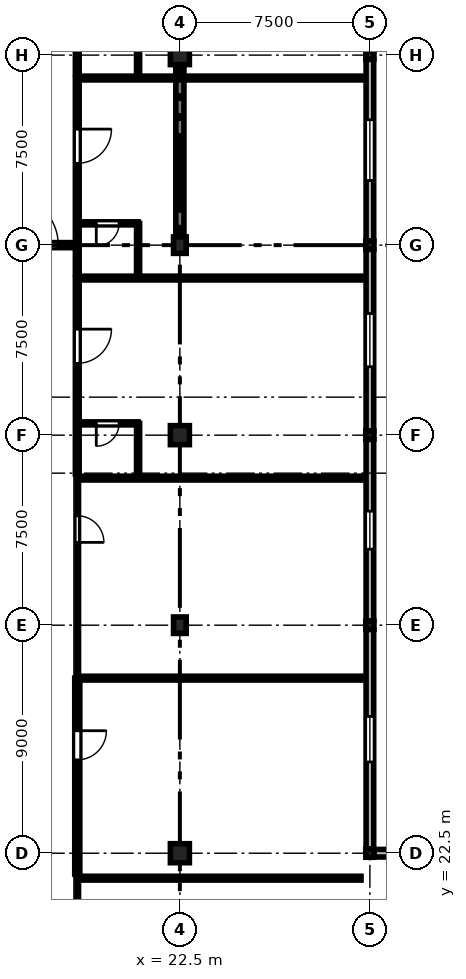
"""IFC4 building model, lengths in metres.
Left out: names, types, materials, properties, quantities, classifications, styles, units other than length and angle.
Written with IfcOpenShell. Run it as: python <this file> out.ifc"""

import sys

from ifc_helpers import new_model, si_unit, direction, frame, frame_2d, origin, origin_2d, place, context, subcontext, project, spatial, rectangle, extrude, element, fill, save


model = new_model("IFC4")
c1 = context("Model", 3, precision=1e-05, world=origin(), true_north=direction((0.0, 1.0)))
c2 = subcontext(c1, "Body", "Model", "MODEL_VIEW")
j1 = project(units=[si_unit("LENGTHUNIT", "METRE"), si_unit("PLANEANGLEUNIT", "RADIAN")], contexts=[c1])
p1 = place(None, origin())
s1 = spatial("IfcSite", under=j1, at=p1, CompositionType="ELEMENT")
p2 = place(p1, origin())
s2 = spatial("IfcBuilding", under=s1, at=p2, CompositionType="ELEMENT")
p3 = place(p2, frame((0.0, 0.0, 14.1)))
s3 = spatial("IfcBuildingStorey", under=s2, at=p3, CompositionType="ELEMENT", Elevation=14.1)
p4 = place(p3, frame((22.5, 22.5, 0.0), z_axis=(0.0, 0.0, 1.0), x_axis=(1.0, 0.0, 0.0)))
e1 = element("IfcColumn", 1, at=p4, inside=s3, PredefinedType="COLUMN", context=c2, shape_type="SweptSolid", body=[
    extrude(rectangle(XDim=0.75, YDim=0.75, at=origin_2d()), origin(), (0.0, 0.0, 1.0), 3.75),
])
p5 = place(p3, frame((22.5, 31.5, 0.0), z_axis=(0.0, 0.0, 1.0), x_axis=(1.0, 0.0, 0.0)))
e2 = element("IfcColumn", 2, at=p5, inside=s3, PredefinedType="COLUMN", context=c2, shape_type="SweptSolid", body=[
    extrude(rectangle(XDim=0.5, YDim=0.65, at=origin_2d()), origin(), (0.0, 0.0, 1.0), 3.75),
])
p6 = place(p3, frame((22.5, 39.0, 0.0), z_axis=(0.0, 0.0, 1.0), x_axis=(1.0, 0.0, 0.0)))
e3 = element("IfcColumn", 3, at=p6, inside=s3, PredefinedType="COLUMN", context=c2, shape_type="SweptSolid", body=[
    extrude(rectangle(XDim=0.75, YDim=0.75, at=origin_2d()), origin(), (0.0, 0.0, 1.0), 3.75),
])
p7 = place(p3, frame((22.5, 46.5, 0.0), z_axis=(0.0, 0.0, 1.0), x_axis=(1.0, 0.0, 0.0)))
e4 = element("IfcColumn", 4, at=p7, inside=s3, PredefinedType="COLUMN", context=c2, shape_type="SweptSolid", body=[
    extrude(rectangle(XDim=0.5, YDim=0.65, at=origin_2d()), origin(), (0.0, 0.0, 1.0), 3.75),
])
p8 = place(p3, frame((22.5, 54.0, 0.0), z_axis=(0.0, 0.0, 1.0), x_axis=(1.0, 0.0, 0.0)))
e5 = element("IfcColumn", 5, at=p8, inside=s3, PredefinedType="COLUMN", context=c2, shape_type="SweptSolid", body=[
    extrude(rectangle(XDim=0.75, YDim=0.75, at=origin_2d()), origin(), (0.0, 0.0, 1.0), 3.75),
])
for number, where, z_axis, x_axis in (
    (6, (30.0, 22.5, 0.0), (0.0, 0.0, 1.0), (1.0, 0.0, 0.0)),
    (7, (30.0, 31.5, 0.0), (0.0, 0.0, 1.0), (1.0, 0.0, 0.0)),
    (8, (30.0, 39.0, 0.0), (0.0, 0.0, 1.0), (1.0, 0.0, 0.0)),
    (9, (30.0, 46.5, 0.0), (0.0, 0.0, 1.0), (1.0, 0.0, 0.0)),
    (10, (30.0, 54.0, 0.0), (0.0, 0.0, 1.0), (1.0, 0.0, 0.0)),
):
    element("IfcColumn", number, at=place(p3, frame(where, z_axis=z_axis, x_axis=x_axis)), inside=s3, PredefinedType="COLUMN", context=c2, shape_type="SweptSolid", body=[
        extrude(rectangle(XDim=0.32, YDim=0.32, at=origin_2d()), origin(), (0.0, 0.0, 1.0), 3.75),
    ])
p9 = place(p3, frame((22.5, 46.95, 0.0), z_axis=(0.0, 0.0, 1.0), x_axis=(0.0, 1.0, 0.0)))
e11 = element("IfcWall", 11, at=p9, inside=s3, PredefinedType="SHEAR", context=c2, shape_type="SweptSolid", body=[
    extrude(rectangle(XDim=6.6, YDim=0.32, at=frame_2d((3.3, 0.0))), origin(), (0.0, 0.0, 1.0), 2.92),
])
p10 = place(p3, frame((30.0, 31.33, 0.0), z_axis=(0.0, 0.0, 1.0), x_axis=(0.0, -1.0, 0.0)))
e12 = element("IfcWall", 12, at=p10, inside=s3, PredefinedType="STANDARD", context=c2, shape_type="SweptSolid", body=[
    extrude(rectangle(XDim=8.66, YDim=0.3, at=frame_2d((4.33, 0.0))), origin(), (0.0, 0.0, 1.0), 2.92),
])
p11 = place(p10, frame((3.43, 0.0, 0.9)))
e13 = element("IfcOpeningElement", 13, at=p11, cuts=e12, PredefinedType="OPENING", context=c2, shape_type="SweptSolid", body=[
    extrude(rectangle(XDim=1.8, YDim=1.74, at=frame_2d((0.9, 0.87))), frame((0.0, 0.16, 0.0), z_axis=(0.0, -1.0, 0.0), x_axis=(1.0, 0.0, 0.0)), (0.0, 0.0, 1.0), 0.32),
])
p12 = place(p3, frame((30.0, 38.83, 0.0), z_axis=(0.0, 0.0, 1.0), x_axis=(0.0, -1.0, 0.0)))
e14 = element("IfcWall", 14, at=p12, inside=s3, PredefinedType="STANDARD", context=c2, shape_type="SweptSolid", body=[
    extrude(rectangle(XDim=7.16, YDim=0.3, at=frame_2d((3.58, 0.0))), origin(), (0.0, 0.0, 1.0), 2.87),
])
p13 = place(p12, frame((2.83, 0.0, 0.9)))
e15 = element("IfcOpeningElement", 15, at=p13, cuts=e14, PredefinedType="OPENING", context=c2, shape_type="SweptSolid", body=[
    extrude(rectangle(XDim=1.5, YDim=1.69, at=frame_2d((0.75, 0.845))), frame((0.0, 0.16, 0.0), z_axis=(0.0, -1.0, 0.0), x_axis=(1.0, 0.0, 0.0)), (0.0, 0.0, 1.0), 0.32),
])
p14 = place(p3, frame((30.0, 46.33, 0.0), z_axis=(0.0, 0.0, 1.0), x_axis=(0.0, -1.0, 0.0)))
e16 = element("IfcWall", 16, at=p14, inside=s3, PredefinedType="STANDARD", context=c2, shape_type="SweptSolid", body=[
    extrude(rectangle(XDim=7.16, YDim=0.3, at=frame_2d((3.58, 0.0))), origin(), (0.0, 0.0, 1.0), 2.87),
])
p15 = place(p14, frame((2.53, 0.0, 0.9)))
e17 = element("IfcOpeningElement", 17, at=p15, cuts=e16, PredefinedType="OPENING", context=c2, shape_type="SweptSolid", body=[
    extrude(rectangle(XDim=2.1, YDim=1.69, at=frame_2d((1.05, 0.845))), frame((0.0, 0.16, 0.0), z_axis=(0.0, -1.0, 0.0), x_axis=(1.0, 0.0, 0.0)), (0.0, 0.0, 1.0), 0.32),
])
p16 = place(p3, frame((30.0, 53.83, 0.0), z_axis=(0.0, 0.0, 1.0), x_axis=(0.0, -1.0, 0.0)))
e18 = element("IfcWall", 18, at=p16, inside=s3, PredefinedType="STANDARD", context=c2, shape_type="SweptSolid", body=[
    extrude(rectangle(XDim=7.16, YDim=0.3, at=frame_2d((3.58, 0.0))), origin(), (0.0, 0.0, 1.0), 2.87),
])
p17 = place(p16, frame((2.38, 0.0, 0.9)))
e19 = element("IfcOpeningElement", 19, at=p17, cuts=e18, PredefinedType="OPENING", context=c2, shape_type="SweptSolid", body=[
    extrude(rectangle(XDim=2.4, YDim=1.69, at=frame_2d((1.2, 0.845))), frame((0.0, 0.16, 0.0), z_axis=(0.0, -1.0, 0.0), x_axis=(1.0, 0.0, 0.0)), (0.0, 0.0, 1.0), 0.32),
])
p18 = place(p3, frame((30.17, 22.5, 0.0), z_axis=(0.0, 0.0, 1.0), x_axis=(1.0, 0.0, 0.0)))
e20 = element("IfcWall", 20, at=p18, inside=s3, PredefinedType="STANDARD", context=c2, shape_type="SweptSolid", body=[
    extrude(rectangle(XDim=7.16, YDim=0.3, at=frame_2d((3.58, 0.0))), origin(), (0.0, 0.0, 1.0), 2.87),
])
p19 = place(p18, frame((2.68, 0.0, 0.9)))
e21 = element("IfcOpeningElement", 21, at=p19, cuts=e20, PredefinedType="OPENING", context=c2, shape_type="SweptSolid", body=[
    extrude(rectangle(XDim=1.8, YDim=1.69, at=frame_2d((0.9, 0.845))), frame((0.0, 0.16, 0.0), z_axis=(0.0, -1.0, 0.0), x_axis=(1.0, 0.0, 0.0)), (0.0, 0.0, 1.0), 0.32),
])
p20 = place(p3, frame((18.45, 21.515, 0.0), z_axis=(0.0, 0.0, 1.0), x_axis=(0.0, -1.0, 0.0)))
e22 = element("IfcWall", 22, at=p20, inside=s3, PredefinedType="PARTITIONING", context=c2, shape_type="SweptSolid", body=[
    extrude(rectangle(XDim=7.735, YDim=0.1, at=frame_2d((3.867, 0.0))), origin(), (0.0, 0.0, 1.0), 3.455),
])
p21 = place(p20, frame((2.075, 0.0, 0.0)))
e23 = element("IfcOpeningElement", 23, at=p21, cuts=e22, PredefinedType="OPENING", context=c2, shape_type="SweptSolid", body=[
    extrude(rectangle(XDim=1.15, YDim=2.2, at=frame_2d((0.575, 1.1))), frame((0.0, 0.06, 0.0), z_axis=(0.0, -1.0, 0.0), x_axis=(1.0, 0.0, 0.0)), (0.0, 0.0, 1.0), 0.12),
])
p22 = place(p3, frame((18.45, 29.41, 0.0), z_axis=(0.0, 0.0, 1.0), x_axis=(0.0, -1.0, 0.0)))
e24 = element("IfcWall", 24, at=p22, inside=s3, PredefinedType="STANDARD", context=c2, shape_type="SweptSolid", body=[
    extrude(rectangle(XDim=7.735, YDim=0.2, at=frame_2d((3.867, 0.0))), origin(), (0.0, 0.0, 1.0), 3.055),
])
p23 = place(p22, frame((2.075, 0.0, 0.0)))
e25 = element("IfcOpeningElement", 25, at=p23, cuts=e24, PredefinedType="OPENING", context=c2, shape_type="SweptSolid", body=[
    extrude(rectangle(XDim=1.15, YDim=2.2, at=frame_2d((0.575, 1.1))), frame((0.0, 0.11, 0.0), z_axis=(0.0, -1.0, 0.0), x_axis=(1.0, 0.0, 0.0)), (0.0, 0.0, 1.0), 0.22),
])
p24 = place(p3, frame((18.45, 37.305, 0.0), z_axis=(0.0, 0.0, 1.0), x_axis=(0.0, -1.0, 0.0)))
e26 = element("IfcWall", 26, at=p24, inside=s3, PredefinedType="PARTITIONING", context=c2, shape_type="SweptSolid", body=[
    extrude(rectangle(XDim=7.735, YDim=0.1, at=frame_2d((3.867, 0.0))), origin(), (0.0, 0.0, 1.0), 3.055),
])
p25 = place(p24, frame((1.487, 0.0, 0.0)))
e27 = element("IfcOpeningElement", 27, at=p25, cuts=e26, PredefinedType="OPENING", context=c2, shape_type="SweptSolid", body=[
    extrude(rectangle(XDim=1.05, YDim=2.2, at=frame_2d((0.525, 1.1))), frame((0.0, 0.06, 0.0), z_axis=(0.0, -1.0, 0.0), x_axis=(1.0, 0.0, 0.0)), (0.0, 0.0, 1.0), 0.12),
])
p26 = place(p3, frame((18.45, 45.2, 0.0), z_axis=(0.0, 0.0, 1.0), x_axis=(0.0, -1.0, 0.0)))
e28 = element("IfcWall", 28, at=p26, inside=s3, PredefinedType="PARTITIONING", context=c2, shape_type="SweptSolid", body=[
    extrude(rectangle(XDim=7.735, YDim=0.15, at=frame_2d((3.867, 0.0))), origin(), (0.0, 0.0, 1.0), 3.455),
])
p27 = place(p26, frame((2.015, 0.0, 0.0)))
e29 = element("IfcOpeningElement", 29, at=p27, cuts=e28, PredefinedType="OPENING", context=c2, shape_type="SweptSolid", body=[
    extrude(rectangle(XDim=1.35, YDim=2.25, at=frame_2d((0.675, 1.125))), frame((0.0, 0.085, 0.0), z_axis=(0.0, -1.0, 0.0), x_axis=(1.0, 0.0, 0.0)), (0.0, 0.0, 1.0), 0.17),
])
p28 = place(p3, frame((20.85, 39.465, 0.0), z_axis=(0.0, 0.0, 1.0), x_axis=(-1.0, 0.0, 0.0)))
e30 = element("IfcWall", 30, at=p28, inside=s3, PredefinedType="PARTITIONING", context=c2, shape_type="SweptSolid", body=[
    extrude(rectangle(XDim=2.4, YDim=0.12, at=frame_2d((1.2, 0.0))), origin(), (0.0, 0.0, 1.0), 3.455),
])
p29 = place(p28, frame((0.75, 0.0, 0.0)))
e31 = element("IfcOpeningElement", 31, at=p29, cuts=e30, PredefinedType="OPENING", context=c2, shape_type="SweptSolid", body=[
    extrude(rectangle(XDim=0.9, YDim=2.1, at=frame_2d((0.45, 1.05))), frame((0.0, 0.07, 0.0), z_axis=(0.0, -1.0, 0.0), x_axis=(1.0, 0.0, 0.0)), (0.0, 0.0, 1.0), 0.14),
])
p30 = place(p3, frame((20.85, 37.465, 0.0), z_axis=(0.0, 0.0, 1.0), x_axis=(0.0, 1.0, 0.0)))
e32 = element("IfcWall", 32, at=p30, inside=s3, PredefinedType="PARTITIONING", context=c2, shape_type="SweptSolid", body=[
    extrude(rectangle(XDim=2.0, YDim=0.12, at=frame_2d((1.0, 0.0))), origin(), (0.0, 0.0, 1.0), 3.455),
])
p31 = place(p3, frame((18.45, 53.095, 0.0), z_axis=(0.0, 0.0, 1.0), x_axis=(0.0, -1.0, 0.0)))
e33 = element("IfcWall", 33, at=p31, inside=s3, PredefinedType="PARTITIONING", context=c2, shape_type="SweptSolid", body=[
    extrude(rectangle(XDim=7.735, YDim=0.15, at=frame_2d((3.867, 0.0))), origin(), (0.0, 0.0, 1.0), 3.455),
])
p32 = place(p31, frame((2.015, 0.0, 0.0)))
e34 = element("IfcOpeningElement", 34, at=p32, cuts=e33, PredefinedType="OPENING", context=c2, shape_type="SweptSolid", body=[
    extrude(rectangle(XDim=1.35, YDim=2.25, at=frame_2d((0.675, 1.125))), frame((0.0, 0.085, 0.0), z_axis=(0.0, -1.0, 0.0), x_axis=(1.0, 0.0, 0.0)), (0.0, 0.0, 1.0), 0.17),
])
p33 = place(p3, frame((20.85, 47.36, 0.0), z_axis=(0.0, 0.0, 1.0), x_axis=(-1.0, 0.0, 0.0)))
e35 = element("IfcWall", 35, at=p33, inside=s3, PredefinedType="PARTITIONING", context=c2, shape_type="SweptSolid", body=[
    extrude(rectangle(XDim=2.4, YDim=0.12, at=frame_2d((1.2, 0.0))), origin(), (0.0, 0.0, 1.0), 3.455),
])
p34 = place(p33, frame((0.75, 0.0, 0.0)))
e36 = element("IfcOpeningElement", 36, at=p34, cuts=e35, PredefinedType="OPENING", context=c2, shape_type="SweptSolid", body=[
    extrude(rectangle(XDim=0.9, YDim=2.1, at=frame_2d((0.45, 1.05))), frame((0.0, 0.07, 0.0), z_axis=(0.0, -1.0, 0.0), x_axis=(1.0, 0.0, 0.0)), (0.0, 0.0, 1.0), 0.14),
])
p35 = place(p3, frame((20.85, 45.36, 0.0), z_axis=(0.0, 0.0, 1.0), x_axis=(0.0, 1.0, 0.0)))
e37 = element("IfcWall", 37, at=p35, inside=s3, PredefinedType="PARTITIONING", context=c2, shape_type="SweptSolid", body=[
    extrude(rectangle(XDim=2.0, YDim=0.12, at=frame_2d((1.0, 0.0))), origin(), (0.0, 0.0, 1.0), 3.455),
])
p36 = place(p3, frame((18.45, 60.99, 0.0), z_axis=(0.0, 0.0, 1.0), x_axis=(0.0, -1.0, 0.0)))
e38 = element("IfcWall", 38, at=p36, inside=s3, PredefinedType="PARTITIONING", context=c2, shape_type="SweptSolid", body=[
    extrude(rectangle(XDim=7.735, YDim=0.15, at=frame_2d((3.868, 0.0))), origin(), (0.0, 0.0, 1.0), 3.455),
])
p37 = place(p36, frame((2.604, 0.0, 0.0)))
e39 = element("IfcOpeningElement", 39, at=p37, cuts=e38, PredefinedType="OPENING", context=c2, shape_type="SweptSolid", body=[
    extrude(rectangle(XDim=1.35, YDim=2.25, at=frame_2d((0.675, 1.125))), frame((0.0, 0.085, 0.0), z_axis=(0.0, -1.0, 0.0), x_axis=(1.0, 0.0, 0.0)), (0.0, 0.0, 1.0), 0.17),
])
p38 = place(p3, frame((20.85, 53.255, 0.0), z_axis=(0.0, 0.0, 1.0), x_axis=(0.0, 1.0, 0.0)))
e40 = element("IfcWall", 40, at=p38, inside=s3, PredefinedType="PARTITIONING", context=c2, shape_type="SweptSolid", body=[
    extrude(rectangle(XDim=2.0, YDim=0.12, at=frame_2d((1.0, 0.0))), origin(), (0.0, 0.0, 1.0), 3.455),
])
for number, where, z_axis, x_axis in (
    (41, (18.45, 21.515, 0.0), (0.0, 0.0, 1.0), (1.0, 0.0, 0.0)),
    (42, (18.45, 29.41, 0.0), (0.0, 0.0, 1.0), (1.0, 0.0, 0.0)),
    (43, (18.45, 37.305, 0.0), (0.0, 0.0, 1.0), (1.0, 0.0, 0.0)),
    (44, (18.45, 45.2, 0.0), (0.0, 0.0, 1.0), (1.0, 0.0, 0.0)),
    (45, (18.45, 53.095, 0.0), (0.0, 0.0, 1.0), (1.0, 0.0, 0.0)),
):
    element("IfcWall", number, at=place(p3, frame(where, z_axis=z_axis, x_axis=x_axis)), inside=s3, PredefinedType="PARTITIONING", context=c2, shape_type="SweptSolid", body=[
        extrude(rectangle(XDim=11.2, YDim=0.15, at=frame_2d((5.6, 0.0))), origin(), (0.0, 0.0, 1.0), 3.455),
    ])
p39 = place(p3, frame((15.2, 46.5, 0.0), z_axis=(0.0, 0.0, 1.0), x_axis=(1.0, 0.0, 0.0)))
e46 = element("IfcWall", 46, at=p39, inside=s3, PredefinedType="STANDARD", context=c2, shape_type="SweptSolid", body=[
    extrude(rectangle(XDim=3.0, YDim=0.2, at=frame_2d((1.5, 0.0))), origin(), (0.0, 0.0, 1.0), 2.855),
])
p40 = place(p39, frame((0.5, 0.0, 0.0)))
e47 = element("IfcOpeningElement", 47, at=p40, cuts=e46, PredefinedType="OPENING", context=c2, shape_type="SweptSolid", body=[
    extrude(rectangle(XDim=2.0, YDim=2.3, at=frame_2d((1.0, 1.15))), frame((0.0, 0.11, 0.0), z_axis=(0.0, -1.0, 0.0), x_axis=(1.0, 0.0, 0.0)), (0.0, 0.0, 1.0), 0.22),
])
p41 = place(p11, origin())
e48 = element("IfcWindow", 48, at=p41, inside=s3, PartitioningType="SINGLE_PANEL", PredefinedType="WINDOW", context=c2, shape_type="SweptSolid", body=[
    extrude(rectangle(XDim=1.8, YDim=1.74, at=frame_2d((0.9, 0.87))), frame((0.0, 0.03, 0.0), z_axis=(0.0, -1.0, 0.0), x_axis=(1.0, 0.0, 0.0)), (0.0, 0.0, 1.0), 0.06),
])
fill(e13, e48)
p42 = place(p13, origin())
e49 = element("IfcWindow", 49, at=p42, inside=s3, PartitioningType="SINGLE_PANEL", PredefinedType="WINDOW", context=c2, shape_type="SweptSolid", body=[
    extrude(rectangle(XDim=1.5, YDim=1.69, at=frame_2d((0.75, 0.845))), frame((0.0, 0.03, 0.0), z_axis=(0.0, -1.0, 0.0), x_axis=(1.0, 0.0, 0.0)), (0.0, 0.0, 1.0), 0.06),
])
fill(e15, e49)
p43 = place(p15, origin())
e50 = element("IfcWindow", 50, at=p43, inside=s3, PartitioningType="SINGLE_PANEL", PredefinedType="WINDOW", context=c2, shape_type="SweptSolid", body=[
    extrude(rectangle(XDim=2.1, YDim=1.69, at=frame_2d((1.05, 0.845))), frame((0.0, 0.03, 0.0), z_axis=(0.0, -1.0, 0.0), x_axis=(1.0, 0.0, 0.0)), (0.0, 0.0, 1.0), 0.06),
])
fill(e17, e50)
p44 = place(p17, origin())
e51 = element("IfcWindow", 51, at=p44, inside=s3, PartitioningType="SINGLE_PANEL", PredefinedType="WINDOW", context=c2, shape_type="SweptSolid", body=[
    extrude(rectangle(XDim=2.4, YDim=1.69, at=frame_2d((1.2, 0.845))), frame((0.0, 0.03, 0.0), z_axis=(0.0, -1.0, 0.0), x_axis=(1.0, 0.0, 0.0)), (0.0, 0.0, 1.0), 0.06),
])
fill(e19, e51)
p45 = place(p23, origin())
e52 = element("IfcDoor", 52, at=p45, inside=s3, OperationType="SINGLE_SWING_LEFT", PredefinedType="DOOR", context=c2, shape_type="SweptSolid", body=[
    extrude(rectangle(XDim=1.15, YDim=2.2, at=frame_2d((0.575, 1.1))), frame((0.0, 0.025, 0.0), z_axis=(0.0, -1.0, 0.0), x_axis=(1.0, 0.0, 0.0)), (0.0, 0.0, 1.0), 0.05),
])
fill(e25, e52)
p46 = place(p25, origin())
e53 = element("IfcDoor", 53, at=p46, inside=s3, OperationType="SINGLE_SWING_RIGHT", PredefinedType="DOOR", context=c2, shape_type="SweptSolid", body=[
    extrude(rectangle(XDim=1.05, YDim=2.2, at=frame_2d((0.525, 1.1))), frame((0.0, 0.025, 0.0), z_axis=(0.0, -1.0, 0.0), x_axis=(1.0, 0.0, 0.0)), (0.0, 0.0, 1.0), 0.05),
])
fill(e27, e53)
p47 = place(p27, origin())
e54 = element("IfcDoor", 54, at=p47, inside=s3, OperationType="SINGLE_SWING_LEFT", PredefinedType="DOOR", context=c2, shape_type="SweptSolid", body=[
    extrude(rectangle(XDim=1.35, YDim=2.25, at=frame_2d((0.675, 1.125))), frame((0.0, 0.025, 0.0), z_axis=(0.0, -1.0, 0.0), x_axis=(1.0, 0.0, 0.0)), (0.0, 0.0, 1.0), 0.05),
])
fill(e29, e54)
p48 = place(p29, origin())
e55 = element("IfcDoor", 55, at=p48, inside=s3, OperationType="SINGLE_SWING_RIGHT", PredefinedType="DOOR", context=c2, shape_type="SweptSolid", body=[
    extrude(rectangle(XDim=0.9, YDim=2.1, at=frame_2d((0.45, 1.05))), frame((0.0, 0.025, 0.0), z_axis=(0.0, -1.0, 0.0), x_axis=(1.0, 0.0, 0.0)), (0.0, 0.0, 1.0), 0.05),
])
fill(e31, e55)
p49 = place(p32, origin())
e56 = element("IfcDoor", 56, at=p49, inside=s3, OperationType="SINGLE_SWING_LEFT", PredefinedType="DOOR", context=c2, shape_type="SweptSolid", body=[
    extrude(rectangle(XDim=1.35, YDim=2.25, at=frame_2d((0.675, 1.125))), frame((0.0, 0.025, 0.0), z_axis=(0.0, -1.0, 0.0), x_axis=(1.0, 0.0, 0.0)), (0.0, 0.0, 1.0), 0.05),
])
fill(e34, e56)
p50 = place(p34, origin())
e57 = element("IfcDoor", 57, at=p50, inside=s3, OperationType="SINGLE_SWING_RIGHT", PredefinedType="DOOR", context=c2, shape_type="SweptSolid", body=[
    extrude(rectangle(XDim=0.9, YDim=2.1, at=frame_2d((0.45, 1.05))), frame((0.0, 0.025, 0.0), z_axis=(0.0, -1.0, 0.0), x_axis=(1.0, 0.0, 0.0)), (0.0, 0.0, 1.0), 0.05),
])
fill(e36, e57)
p51 = place(p40, origin())
e58 = element("IfcDoor", 58, at=p51, inside=s3, OperationType="DOUBLE_DOOR_SINGLE_SWING", PredefinedType="DOOR", context=c2, shape_type="SweptSolid", body=[
    extrude(rectangle(XDim=2.0, YDim=2.3, at=frame_2d((1.0, 1.15))), frame((0.0, 0.025, 0.0), z_axis=(0.0, -1.0, 0.0), x_axis=(1.0, 0.0, 0.0)), (0.0, 0.0, 1.0), 0.05),
])
fill(e47, e58)
save(model, sys.argv[1])
